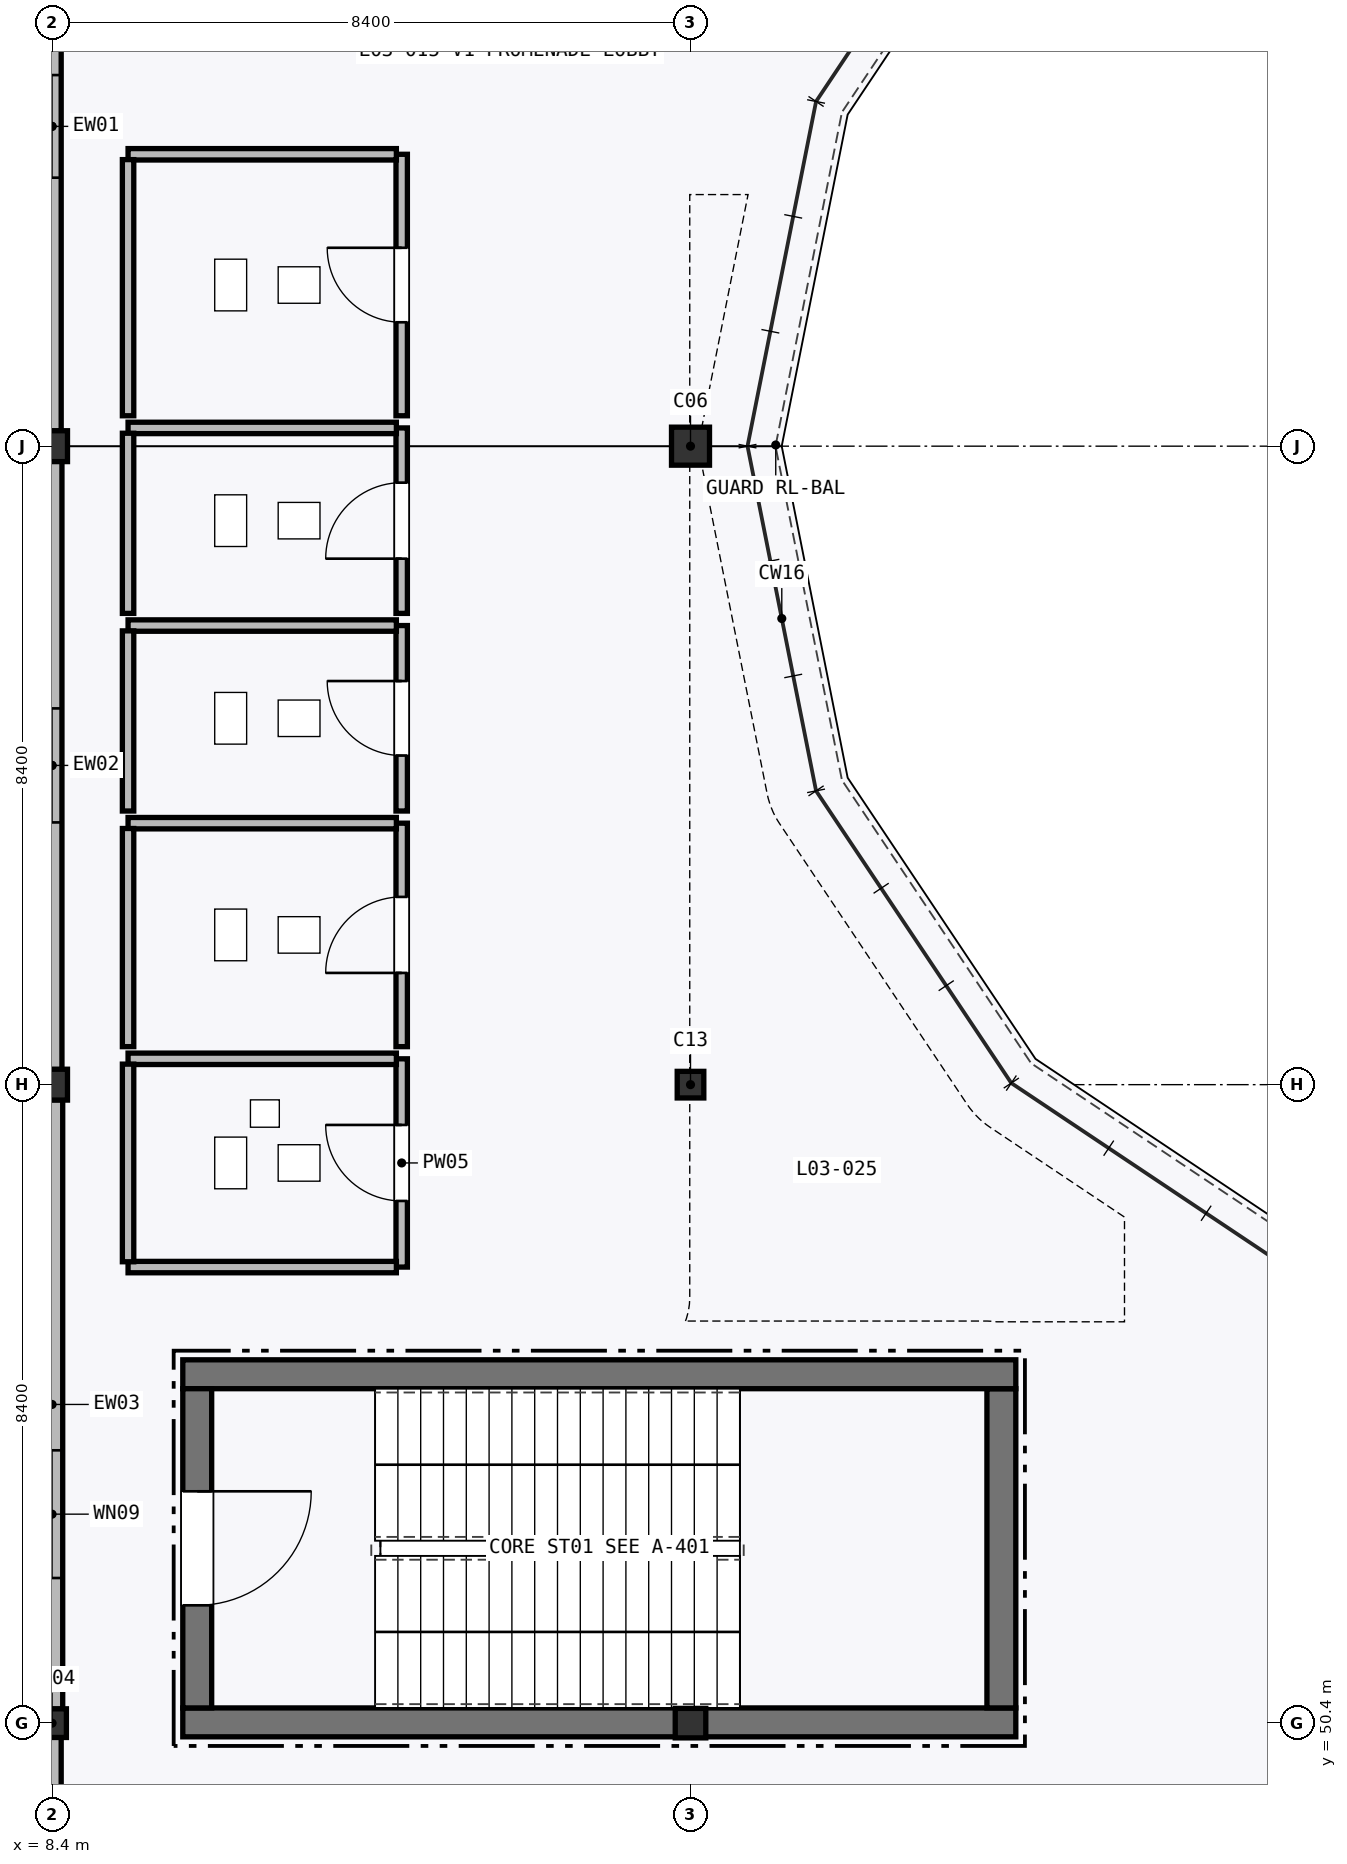
"""IFC4 building model, lengths in metres.
Left out: names, types, materials, properties, quantities, classifications, styles, units other than length and angle.
Written with IfcOpenShell. Run it as: python <this file> out.ifc"""

import sys

from ifc_helpers import new_model, si_unit, direction, frame, frame_2d, origin, origin_2d, place, context, subcontext, project, spatial, rectangle, hollow_rectangle, hollow_circle, i_section, extrude, element, fill, save


model = new_model("IFC4")
c1 = context("Model", 3, precision=1e-05, world=origin(), true_north=direction((0.0, 1.0)))
c2 = subcontext(c1, "Body", "Model", "MODEL_VIEW")
j1 = project(units=[si_unit("LENGTHUNIT", "METRE"), si_unit("PLANEANGLEUNIT", "RADIAN")], contexts=[c1])
p1 = place(None, origin())
s1 = spatial("IfcSite", under=j1, at=p1, CompositionType="ELEMENT")
p2 = place(p1, origin())
s2 = spatial("IfcBuilding", under=s1, at=p2, CompositionType="ELEMENT")
p3 = place(p2, frame((0.0, 0.0, 11.4)))
s3 = spatial("IfcBuildingStorey", under=s2, at=p3, CompositionType="ELEMENT", Elevation=11.4)
p4 = place(p3, frame((8.4, 50.4, 0.0), z_axis=(0.0, 0.0, 1.0), x_axis=(1.0, 0.0, 0.0)))
e1 = element("IfcColumn", 1, at=p4, inside=s3, PredefinedType="COLUMN", context=c2, shape_type="SweptSolid", body=[
    extrude(hollow_circle(Radius=0.188, WallThickness=0.014, at=origin_2d()), origin(), (0.0, 0.0, 1.0), 5.1),
])
for number, where, z_axis, x_axis in (
    (2, (8.4, 58.8, 0.0), (0.0, 0.0, 1.0), (1.0, 0.0, 0.0)),
    (3, (8.4, 67.2, 0.0), (0.0, 0.0, 1.0), (1.0, 0.0, 0.0)),
):
    element("IfcColumn", number, at=place(p3, frame(where, z_axis=z_axis, x_axis=x_axis)), inside=s3, PredefinedType="COLUMN", context=c2, shape_type="SweptSolid", body=[
        extrude(hollow_circle(Radius=0.203, WallThickness=0.016, at=origin_2d()), origin(), (0.0, 0.0, 1.0), 5.1),
    ])
p5 = place(p3, frame((16.8, 50.4, 0.0), z_axis=(0.0, 0.0, 1.0), x_axis=(1.0, 0.0, 0.0)))
e4 = element("IfcColumn", 4, at=p5, inside=s3, PredefinedType="COLUMN", context=c2, shape_type="SweptSolid", body=[
    extrude(i_section(OverallWidth=0.402, OverallDepth=0.388, WebThickness=0.015, FlangeThickness=0.015, FilletRadius=0.022, at=origin_2d()), origin(), (0.0, 0.0, 1.0), 5.1),
])
p6 = place(p3, frame((16.8, 58.8, 0.0), z_axis=(0.0, 0.0, 1.0), x_axis=(1.0, 0.0, 0.0)))
e5 = element("IfcColumn", 5, at=p6, inside=s3, PredefinedType="COLUMN", context=c2, shape_type="SweptSolid", body=[
    extrude(i_section(OverallWidth=0.35, OverallDepth=0.35, WebThickness=0.012, FlangeThickness=0.019, FilletRadius=0.02, at=origin_2d()), origin(), (0.0, 0.0, 1.0), 5.1),
])
p7 = place(p3, frame((16.8, 67.2, 0.0), z_axis=(0.0, 0.0, 1.0), x_axis=(1.0, 0.0, 0.0)))
e6 = element("IfcColumn", 6, at=p7, inside=s3, PredefinedType="COLUMN", context=c2, shape_type="SweptSolid", body=[
    extrude(hollow_rectangle(XDim=0.5, YDim=0.5, WallThickness=0.02, at=origin_2d()), origin(), (0.0, 0.0, 1.0), 5.1),
])
p8 = place(p3, frame((8.4, 75.417, 0.0), z_axis=(0.0, 0.0, 1.0), x_axis=(0.0, -1.0, 0.0)))
e7 = element("IfcWall", 7, at=p8, inside=s3, PredefinedType="STANDARD", context=c2, shape_type="SweptSolid", body=[
    extrude(rectangle(XDim=8.019, YDim=0.24, at=frame_2d((4.009, 0.0))), origin(), (0.0, 0.0, 1.0), 4.487),
])
p9 = place(p8, frame((3.334, 0.0, 0.95)))
e8 = element("IfcOpeningElement", 8, at=p9, cuts=e7, PredefinedType="OPENING", context=c2, shape_type="SweptSolid", body=[
    extrude(rectangle(XDim=1.35, YDim=2.1, at=frame_2d((0.675, 1.05))), frame((0.0, 0.13, 0.0), z_axis=(0.0, -1.0, 0.0), x_axis=(1.0, 0.0, 0.0)), (0.0, 0.0, 1.0), 0.26),
])
p10 = place(p3, frame((8.4, 67.002, 0.0), z_axis=(0.0, 0.0, 1.0), x_axis=(0.0, -1.0, 0.0)))
e9 = element("IfcWall", 9, at=p10, inside=s3, PredefinedType="STANDARD", context=c2, shape_type="SweptSolid", body=[
    extrude(rectangle(XDim=8.004, YDim=0.26, at=frame_2d((4.002, 0.0))), origin(), (0.0, 0.0, 1.0), 4.487),
])
p11 = place(p10, frame((3.252, 0.0, 0.95)))
e10 = element("IfcOpeningElement", 10, at=p11, cuts=e9, PredefinedType="OPENING", context=c2, shape_type="SweptSolid", body=[
    extrude(rectangle(XDim=1.5, YDim=2.1, at=frame_2d((0.75, 1.05))), frame((0.0, 0.14, 0.0), z_axis=(0.0, -1.0, 0.0), x_axis=(1.0, 0.0, 0.0)), (0.0, 0.0, 1.0), 0.28),
])
p12 = place(p3, frame((8.4, 58.602, 0.0), z_axis=(0.0, 0.0, 1.0), x_axis=(0.0, -1.0, 0.0)))
e11 = element("IfcWall", 11, at=p12, inside=s3, PredefinedType="STANDARD", context=c2, shape_type="SweptSolid", body=[
    extrude(rectangle(XDim=8.019, YDim=0.28, at=frame_2d((4.009, 0.0))), origin(), (0.0, 0.0, 1.0), 4.487),
])
p13 = place(p12, frame((4.613, 0.0, 0.95)))
e12 = element("IfcOpeningElement", 12, at=p13, cuts=e11, PredefinedType="OPENING", context=c2, shape_type="SweptSolid", body=[
    extrude(rectangle(XDim=1.68, YDim=2.1, at=frame_2d((0.84, 1.05))), frame((0.0, 0.15, 0.0), z_axis=(0.0, -1.0, 0.0), x_axis=(1.0, 0.0, 0.0)), (0.0, 0.0, 1.0), 0.3),
])
p14 = place(p3, frame((8.4, 50.217, 0.0), z_axis=(0.0, 0.0, 1.0), x_axis=(0.0, -1.0, 0.0)))
e13 = element("IfcWall", 13, at=p14, inside=s3, PredefinedType="STANDARD", context=c2, shape_type="SweptSolid", body=[
    extrude(rectangle(XDim=8.019, YDim=0.24, at=frame_2d((4.009, 0.0))), origin(), (0.0, 0.0, 1.0), 4.487),
])
p15 = place(p14, frame((3.109, 0.0, 0.95)))
e14 = element("IfcOpeningElement", 14, at=p15, cuts=e13, PredefinedType="OPENING", context=c2, shape_type="SweptSolid", body=[
    extrude(rectangle(XDim=1.8, YDim=2.1, at=frame_2d((0.9, 1.05))), frame((0.0, 0.13, 0.0), z_axis=(0.0, -1.0, 0.0), x_axis=(1.0, 0.0, 0.0)), (0.0, 0.0, 1.0), 0.26),
])
p16 = place(p3, frame((10.12, 50.41, 0.0), z_axis=(0.0, 0.0, 1.0), x_axis=(1.0, 0.0, 0.0)))
e15 = element("IfcWall", 15, at=p16, inside=s3, PredefinedType="SHEAR", context=c2, shape_type="SweptSolid", body=[
    extrude(rectangle(XDim=10.96, YDim=0.38, at=frame_2d((5.48, 0.0))), origin(), (0.0, 0.0, 1.0), 4.845),
])
p17 = place(p3, frame((20.89, 50.6, 0.0), z_axis=(0.0, 0.0, 1.0), x_axis=(0.0, 1.0, 0.0)))
e16 = element("IfcWall", 16, at=p17, inside=s3, PredefinedType="SHEAR", context=c2, shape_type="SweptSolid", body=[
    extrude(rectangle(XDim=4.2, YDim=0.38, at=frame_2d((2.1, 0.0))), origin(), (0.0, 0.0, 1.0), 4.845),
])
p18 = place(p3, frame((21.08, 54.99, 0.0), z_axis=(0.0, 0.0, 1.0), x_axis=(-1.0, 0.0, 0.0)))
e17 = element("IfcWall", 17, at=p18, inside=s3, PredefinedType="SHEAR", context=c2, shape_type="SweptSolid", body=[
    extrude(rectangle(XDim=10.96, YDim=0.38, at=frame_2d((5.48, 0.0))), origin(), (0.0, 0.0, 1.0), 4.845),
])
p19 = place(p3, frame((10.31, 54.8, 0.0), z_axis=(0.0, 0.0, 1.0), x_axis=(0.0, -1.0, 0.0)))
e18 = element("IfcWall", 18, at=p19, inside=s3, PredefinedType="SHEAR", context=c2, shape_type="SweptSolid", body=[
    extrude(rectangle(XDim=4.2, YDim=0.38, at=frame_2d((2.1, 0.0))), origin(), (0.0, 0.0, 1.0), 4.845),
])
p20 = place(p19, frame((1.35, 0.0, 0.0)))
e19 = element("IfcOpeningElement", 19, at=p20, cuts=e18, PredefinedType="OPENING", context=c2, shape_type="SweptSolid", body=[
    extrude(rectangle(XDim=1.5, YDim=2.15, at=frame_2d((0.75, 1.075))), frame((0.0, 0.2, 0.0), z_axis=(0.0, -1.0, 0.0), x_axis=(1.0, 0.0, 0.0)), (0.0, 0.0, 1.0), 0.4),
])
p21 = place(p3, frame((13.0, 56.4, 0.0), z_axis=(0.0, 0.0, 1.0), x_axis=(0.0, 1.0, 0.0)))
e20 = element("IfcWall", 20, at=p21, inside=s3, PredefinedType="PARTITIONING", context=c2, shape_type="SweptSolid", body=[
    extrude(rectangle(XDim=2.74, YDim=0.15, at=frame_2d((1.37, 0.0))), origin(), (0.0, 0.0, 1.0), 4.845),
])
p22 = place(p21, frame((0.87, 0.0, 0.0)))
e21 = element("IfcOpeningElement", 21, at=p22, cuts=e20, PredefinedType="OPENING", context=c2, shape_type="SweptSolid", body=[
    extrude(rectangle(XDim=1.0, YDim=2.1, at=frame_2d((0.5, 1.05))), frame((0.0, 0.085, 0.0), z_axis=(0.0, -1.0, 0.0), x_axis=(1.0, 0.0, 0.0)), (0.0, 0.0, 1.0), 0.17),
])
p23 = place(p3, frame((9.4, 56.4, 0.0), z_axis=(0.0, 0.0, 1.0), x_axis=(1.0, 0.0, 0.0)))
e22 = element("IfcWall", 22, at=p23, inside=s3, PredefinedType="PARTITIONING", context=c2, shape_type="SweptSolid", body=[
    extrude(rectangle(XDim=3.53, YDim=0.15, at=frame_2d((1.765, 0.0))), origin(), (0.0, 0.0, 1.0), 4.845),
])
p24 = place(p3, frame((12.93, 59.14, 0.0), z_axis=(0.0, 0.0, 1.0), x_axis=(-1.0, 0.0, 0.0)))
e23 = element("IfcWall", 23, at=p24, inside=s3, PredefinedType="PARTITIONING", context=c2, shape_type="SweptSolid", body=[
    extrude(rectangle(XDim=3.53, YDim=0.15, at=frame_2d((1.765, 0.0))), origin(), (0.0, 0.0, 1.0), 3.947),
])
p25 = place(p3, frame((9.4, 59.07, 0.0), z_axis=(0.0, 0.0, 1.0), x_axis=(0.0, -1.0, 0.0)))
e24 = element("IfcWall", 24, at=p25, inside=s3, PredefinedType="PARTITIONING", context=c2, shape_type="SweptSolid", body=[
    extrude(rectangle(XDim=2.6, YDim=0.15, at=frame_2d((1.3, 0.0))), origin(), (0.0, 0.0, 1.0), 4.845),
])
p26 = place(p3, frame((13.0, 59.3, 0.0), z_axis=(0.0, 0.0, 1.0), x_axis=(0.0, 1.0, 0.0)))
e25 = element("IfcWall", 25, at=p26, inside=s3, PredefinedType="PARTITIONING", context=c2, shape_type="SweptSolid", body=[
    extrude(rectangle(XDim=2.94, YDim=0.15, at=frame_2d((1.47, 0.0))), origin(), (0.0, 0.0, 1.0), 4.845),
])
p27 = place(p26, frame((0.97, 0.0, 0.0)))
e26 = element("IfcOpeningElement", 26, at=p27, cuts=e25, PredefinedType="OPENING", context=c2, shape_type="SweptSolid", body=[
    extrude(rectangle(XDim=1.0, YDim=2.1, at=frame_2d((0.5, 1.05))), frame((0.0, 0.085, 0.0), z_axis=(0.0, -1.0, 0.0), x_axis=(1.0, 0.0, 0.0)), (0.0, 0.0, 1.0), 0.17),
])
p28 = place(p3, frame((12.93, 62.24, 0.0), z_axis=(0.0, 0.0, 1.0), x_axis=(-1.0, 0.0, 0.0)))
e27 = element("IfcWall", 27, at=p28, inside=s3, PredefinedType="PARTITIONING", context=c2, shape_type="SweptSolid", body=[
    extrude(rectangle(XDim=3.53, YDim=0.15, at=frame_2d((1.765, 0.0))), origin(), (0.0, 0.0, 1.0), 4.845),
])
p29 = place(p3, frame((9.4, 62.17, 0.0), z_axis=(0.0, 0.0, 1.0), x_axis=(0.0, -1.0, 0.0)))
e28 = element("IfcWall", 28, at=p29, inside=s3, PredefinedType="PARTITIONING", context=c2, shape_type="SweptSolid", body=[
    extrude(rectangle(XDim=2.87, YDim=0.15, at=frame_2d((1.435, 0.0))), origin(), (0.0, 0.0, 1.0), 4.845),
])
p30 = place(p3, frame((13.0, 62.4, 0.0), z_axis=(0.0, 0.0, 1.0), x_axis=(0.0, 1.0, 0.0)))
e29 = element("IfcWall", 29, at=p30, inside=s3, PredefinedType="PARTITIONING", context=c2, shape_type="SweptSolid", body=[
    extrude(rectangle(XDim=2.44, YDim=0.15, at=frame_2d((1.22, 0.0))), origin(), (0.0, 0.0, 1.0), 4.845),
])
p31 = place(p30, frame((0.73, 0.0, 0.0)))
e30 = element("IfcOpeningElement", 30, at=p31, cuts=e29, PredefinedType="OPENING", context=c2, shape_type="SweptSolid", body=[
    extrude(rectangle(XDim=0.98, YDim=2.1, at=frame_2d((0.49, 1.05))), frame((0.0, 0.085, 0.0), z_axis=(0.0, -1.0, 0.0), x_axis=(1.0, 0.0, 0.0)), (0.0, 0.0, 1.0), 0.17),
])
p32 = place(p3, frame((12.93, 64.84, 0.0), z_axis=(0.0, 0.0, 1.0), x_axis=(-1.0, 0.0, 0.0)))
e31 = element("IfcWall", 31, at=p32, inside=s3, PredefinedType="PARTITIONING", context=c2, shape_type="SweptSolid", body=[
    extrude(rectangle(XDim=3.53, YDim=0.15, at=frame_2d((1.765, 0.0))), origin(), (0.0, 0.0, 1.0), 4.845),
])
p33 = place(p3, frame((9.4, 64.77, 0.0), z_axis=(0.0, 0.0, 1.0), x_axis=(0.0, -1.0, 0.0)))
e32 = element("IfcWall", 32, at=p33, inside=s3, PredefinedType="PARTITIONING", context=c2, shape_type="SweptSolid", body=[
    extrude(rectangle(XDim=2.37, YDim=0.15, at=frame_2d((1.185, 0.0))), origin(), (0.0, 0.0, 1.0), 4.845),
])
p34 = place(p3, frame((13.0, 65.0, 0.0), z_axis=(0.0, 0.0, 1.0), x_axis=(0.0, 1.0, 0.0)))
e33 = element("IfcWall", 33, at=p34, inside=s3, PredefinedType="PARTITIONING", context=c2, shape_type="SweptSolid", body=[
    extrude(rectangle(XDim=2.44, YDim=0.15, at=frame_2d((1.22, 0.0))), origin(), (0.0, 0.0, 1.0), 4.845),
])
p35 = place(p34, frame((0.72, 0.0, 0.0)))
e34 = element("IfcOpeningElement", 34, at=p35, cuts=e33, PredefinedType="OPENING", context=c2, shape_type="SweptSolid", body=[
    extrude(rectangle(XDim=1.0, YDim=2.1, at=frame_2d((0.5, 1.05))), frame((0.0, 0.085, 0.0), z_axis=(0.0, -1.0, 0.0), x_axis=(1.0, 0.0, 0.0)), (0.0, 0.0, 1.0), 0.17),
])
p36 = place(p3, frame((12.93, 67.44, 0.0), z_axis=(0.0, 0.0, 1.0), x_axis=(-1.0, 0.0, 0.0)))
e35 = element("IfcWall", 35, at=p36, inside=s3, PredefinedType="PARTITIONING", context=c2, shape_type="SweptSolid", body=[
    extrude(rectangle(XDim=3.53, YDim=0.15, at=frame_2d((1.765, 0.0))), origin(), (0.0, 0.0, 1.0), 4.255),
])
p37 = place(p3, frame((9.4, 67.37, 0.0), z_axis=(0.0, 0.0, 1.0), x_axis=(0.0, -1.0, 0.0)))
e36 = element("IfcWall", 36, at=p37, inside=s3, PredefinedType="PARTITIONING", context=c2, shape_type="SweptSolid", body=[
    extrude(rectangle(XDim=2.37, YDim=0.15, at=frame_2d((1.185, 0.0))), origin(), (0.0, 0.0, 1.0), 4.845),
])
p38 = place(p3, frame((13.0, 67.6, 0.0), z_axis=(0.0, 0.0, 1.0), x_axis=(0.0, 1.0, 0.0)))
e37 = element("IfcWall", 37, at=p38, inside=s3, PredefinedType="PARTITIONING", context=c2, shape_type="SweptSolid", body=[
    extrude(rectangle(XDim=3.44, YDim=0.15, at=frame_2d((1.72, 0.0))), origin(), (0.0, 0.0, 1.0), 4.845),
])
p39 = place(p38, frame((1.23, 0.0, 0.0)))
e38 = element("IfcOpeningElement", 38, at=p39, cuts=e37, PredefinedType="OPENING", context=c2, shape_type="SweptSolid", body=[
    extrude(rectangle(XDim=0.98, YDim=2.1, at=frame_2d((0.49, 1.05))), frame((0.0, 0.085, 0.0), z_axis=(0.0, -1.0, 0.0), x_axis=(1.0, 0.0, 0.0)), (0.0, 0.0, 1.0), 0.17),
])
p40 = place(p3, frame((12.93, 71.04, 0.0), z_axis=(0.0, 0.0, 1.0), x_axis=(-1.0, 0.0, 0.0)))
e39 = element("IfcWall", 39, at=p40, inside=s3, PredefinedType="PARTITIONING", context=c2, shape_type="SweptSolid", body=[
    extrude(rectangle(XDim=3.53, YDim=0.15, at=frame_2d((1.765, 0.0))), origin(), (0.0, 0.0, 1.0), 4.845),
])
p41 = place(p3, frame((9.4, 70.97, 0.0), z_axis=(0.0, 0.0, 1.0), x_axis=(0.0, -1.0, 0.0)))
e40 = element("IfcWall", 40, at=p41, inside=s3, PredefinedType="PARTITIONING", context=c2, shape_type="SweptSolid", body=[
    extrude(rectangle(XDim=3.37, YDim=0.15, at=frame_2d((1.685, 0.0))), origin(), (0.0, 0.0, 1.0), 4.845),
])
p42 = place(p9, origin())
e41 = element("IfcWindow", 41, at=p42, inside=s3, PartitioningType="SINGLE_PANEL", PredefinedType="WINDOW", context=c2, shape_type="SweptSolid", body=[
    extrude(rectangle(XDim=1.35, YDim=2.1, at=frame_2d((0.675, 1.05))), frame((0.0, 0.03, 0.0), z_axis=(0.0, -1.0, 0.0), x_axis=(1.0, 0.0, 0.0)), (0.0, 0.0, 1.0), 0.06),
])
fill(e8, e41)
p43 = place(p11, origin())
e42 = element("IfcWindow", 42, at=p43, inside=s3, PartitioningType="SINGLE_PANEL", PredefinedType="WINDOW", context=c2, shape_type="SweptSolid", body=[
    extrude(rectangle(XDim=1.5, YDim=2.1, at=frame_2d((0.75, 1.05))), frame((0.0, 0.03, 0.0), z_axis=(0.0, -1.0, 0.0), x_axis=(1.0, 0.0, 0.0)), (0.0, 0.0, 1.0), 0.06),
])
fill(e10, e42)
p44 = place(p13, origin())
e43 = element("IfcWindow", 43, at=p44, inside=s3, PartitioningType="SINGLE_PANEL", PredefinedType="WINDOW", context=c2, shape_type="SweptSolid", body=[
    extrude(rectangle(XDim=1.68, YDim=2.1, at=frame_2d((0.84, 1.05))), frame((0.0, 0.03, 0.0), z_axis=(0.0, -1.0, 0.0), x_axis=(1.0, 0.0, 0.0)), (0.0, 0.0, 1.0), 0.06),
])
fill(e12, e43)
p45 = place(p20, origin())
e44 = element("IfcDoor", 44, at=p45, inside=s3, OperationType="SINGLE_SWING_LEFT", PredefinedType="DOOR", context=c2, shape_type="SweptSolid", body=[
    extrude(rectangle(XDim=1.5, YDim=2.15, at=frame_2d((0.75, 1.075))), frame((0.0, 0.025, 0.0), z_axis=(0.0, -1.0, 0.0), x_axis=(1.0, 0.0, 0.0)), (0.0, 0.0, 1.0), 0.05),
])
fill(e19, e44)
p46 = place(p22, origin())
e45 = element("IfcDoor", 45, at=p46, inside=s3, OperationType="SINGLE_SWING_RIGHT", PredefinedType="DOOR", context=c2, shape_type="SweptSolid", body=[
    extrude(rectangle(XDim=1.0, YDim=2.1, at=frame_2d((0.5, 1.05))), frame((0.0, 0.025, 0.0), z_axis=(0.0, -1.0, 0.0), x_axis=(1.0, 0.0, 0.0)), (0.0, 0.0, 1.0), 0.05),
])
fill(e21, e45)
p47 = place(p27, origin())
e46 = element("IfcDoor", 46, at=p47, inside=s3, OperationType="SINGLE_SWING_LEFT", PredefinedType="DOOR", context=c2, shape_type="SweptSolid", body=[
    extrude(rectangle(XDim=1.0, YDim=2.1, at=frame_2d((0.5, 1.05))), frame((0.0, 0.025, 0.0), z_axis=(0.0, -1.0, 0.0), x_axis=(1.0, 0.0, 0.0)), (0.0, 0.0, 1.0), 0.05),
])
fill(e26, e46)
p48 = place(p31, origin())
e47 = element("IfcDoor", 47, at=p48, inside=s3, OperationType="SINGLE_SWING_RIGHT", PredefinedType="DOOR", context=c2, shape_type="SweptSolid", body=[
    extrude(rectangle(XDim=0.98, YDim=2.1, at=frame_2d((0.49, 1.05))), frame((0.0, 0.025, 0.0), z_axis=(0.0, -1.0, 0.0), x_axis=(1.0, 0.0, 0.0)), (0.0, 0.0, 1.0), 0.05),
])
fill(e30, e47)
p49 = place(p35, origin())
e48 = element("IfcDoor", 48, at=p49, inside=s3, OperationType="SINGLE_SWING_LEFT", PredefinedType="DOOR", context=c2, shape_type="SweptSolid", body=[
    extrude(rectangle(XDim=1.0, YDim=2.1, at=frame_2d((0.5, 1.05))), frame((0.0, 0.025, 0.0), z_axis=(0.0, -1.0, 0.0), x_axis=(1.0, 0.0, 0.0)), (0.0, 0.0, 1.0), 0.05),
])
fill(e34, e48)
p50 = place(p39, origin())
e49 = element("IfcDoor", 49, at=p50, inside=s3, OperationType="SINGLE_SWING_RIGHT", PredefinedType="DOOR", context=c2, shape_type="SweptSolid", body=[
    extrude(rectangle(XDim=0.98, YDim=2.1, at=frame_2d((0.49, 1.05))), frame((0.0, 0.025, 0.0), z_axis=(0.0, -1.0, 0.0), x_axis=(1.0, 0.0, 0.0)), (0.0, 0.0, 1.0), 0.05),
])
fill(e38, e49)
save(model, sys.argv[1])
